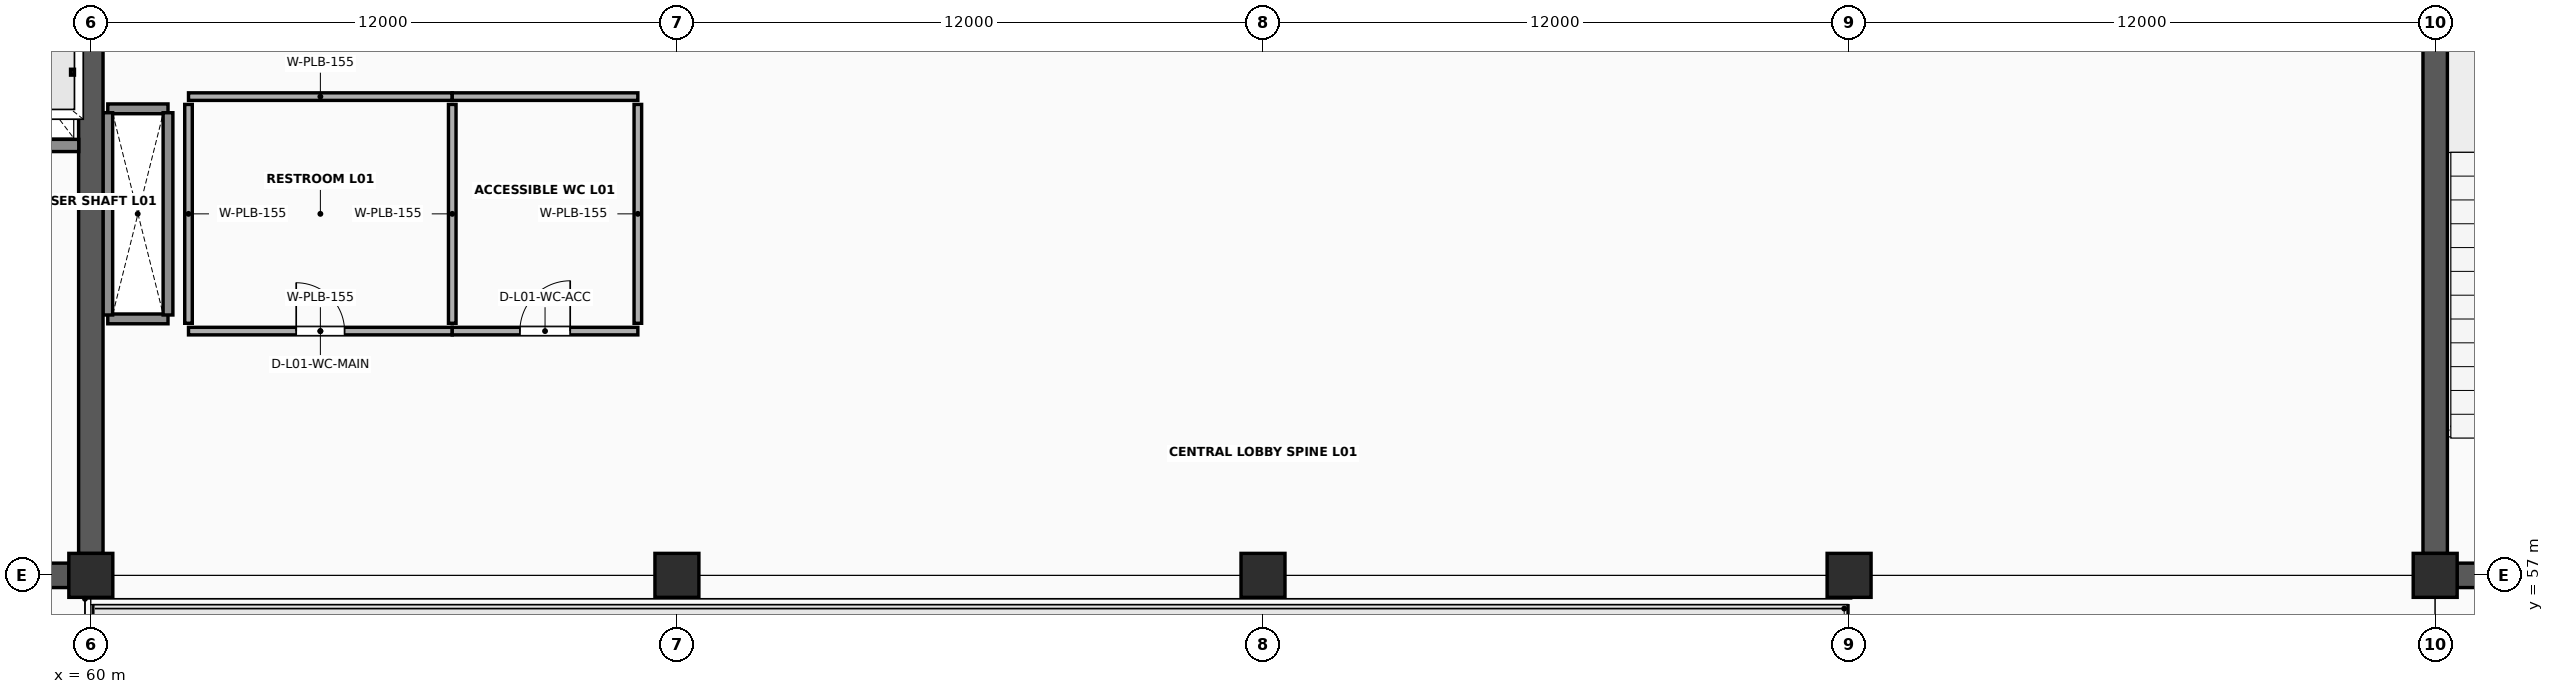
"""IFC4 building model, lengths in metres.
Left out: names, types, materials, properties, quantities, classifications, styles, units other than length and angle.
Written with IfcOpenShell. Run it as: python <this file> out.ifc"""

import sys

from ifc_helpers import new_model, si_unit, direction, frame, frame_2d, origin, origin_2d, place, context, subcontext, project, spatial, rectangle, extrude, element, fill, save


model = new_model("IFC4")
c1 = context("Model", 3, precision=1e-05, world=origin(), true_north=direction((0.0, 1.0)))
c2 = subcontext(c1, "Body", "Model", "MODEL_VIEW")
j1 = project(units=[si_unit("LENGTHUNIT", "METRE"), si_unit("PLANEANGLEUNIT", "RADIAN")], contexts=[c1])
p1 = place(None, origin())
s1 = spatial("IfcSite", under=j1, at=p1, CompositionType="ELEMENT")
p2 = place(p1, origin())
s2 = spatial("IfcBuilding", under=s1, at=p2, CompositionType="ELEMENT")
p3 = place(p2, frame((0.0, 0.0, 5.4)))
s3 = spatial("IfcBuildingStorey", under=s2, at=p3, CompositionType="ELEMENT", Elevation=5.4)
for number, where, z_axis, x_axis in (
    (1, (60.0, 57.0, 0.0), (0.0, 0.0, 1.0), (1.0, 0.0, 0.0)),
    (2, (72.0, 57.0, 0.0), (0.0, 0.0, 1.0), (1.0, 0.0, 0.0)),
    (3, (84.0, 57.0, 0.0), (0.0, 0.0, 1.0), (1.0, 0.0, 0.0)),
    (4, (96.0, 57.0, 0.0), (0.0, 0.0, 1.0), (1.0, 0.0, 0.0)),
    (5, (108.0, 57.0, 0.0), (0.0, 0.0, 1.0), (1.0, 0.0, 0.0)),
):
    element("IfcColumn", number, at=place(p3, frame(where, z_axis=z_axis, x_axis=x_axis)), inside=s3, PredefinedType="COLUMN", context=c2, shape_type="SweptSolid", body=[
        extrude(rectangle(XDim=0.9, YDim=0.9, at=origin_2d()), origin(), (0.0, 0.0, 1.0), 4.2),
    ])
for number, where, z_axis, x_axis in (
    (6, (60.347, 62.25, 0.0), (0.0, 0.0, 1.0), (1.0, 0.0, 0.0)),
    (7, (60.347, 66.55, 0.0), (0.0, 0.0, 1.0), (1.0, 0.0, 0.0)),
):
    element("IfcWall", number, at=place(p3, frame(where, z_axis=z_axis, x_axis=x_axis)), inside=s3, PredefinedType="SOLIDWALL", context=c2, shape_type="SweptSolid", body=[
        extrude(rectangle(XDim=1.233, YDim=0.2, at=frame_2d((0.617, 0.0))), origin(), (0.0, 0.0, 1.0), 4.043),
    ])
for number, where, z_axis, x_axis in (
    (8, (60.347, 62.33, 0.0), (0.0, 0.0, 1.0), (0.0, 1.0, 0.0)),
    (9, (61.58, 62.33, 0.0), (0.0, 0.0, 1.0), (0.0, 1.0, 0.0)),
):
    element("IfcWall", number, at=place(p3, frame(where, z_axis=z_axis, x_axis=x_axis)), inside=s3, PredefinedType="SOLIDWALL", context=c2, shape_type="SweptSolid", body=[
        extrude(rectangle(XDim=4.14, YDim=0.2, at=frame_2d((2.07, 0.0))), origin(), (0.0, 0.0, 1.0), 4.043),
    ])
p4 = place(p3, frame((48.447, 57.0, 0.0), z_axis=(0.0, 0.0, 1.0), x_axis=(1.0, 0.0, 0.0)))
e10 = element("IfcWall", 10, at=p4, inside=s3, PredefinedType="SHEAR", context=c2, shape_type="SweptSolid", body=[
    extrude(rectangle(XDim=11.106, YDim=0.5, at=frame_2d((5.553, 0.0))), origin(), (0.0, 0.0, 1.0), 4.043),
])
p5 = place(p4, frame((4.753, 0.0, 0.0)))
e11 = element("IfcOpeningElement", 11, at=p5, cuts=e10, PredefinedType="OPENING", context=c2, shape_type="SweptSolid", body=[
    extrude(rectangle(XDim=1.2, YDim=2.2, at=frame_2d((0.6, 1.1))), frame((0.0, 0.265, 0.0), z_axis=(0.0, -1.0, 0.0), x_axis=(1.0, 0.0, 0.0)), (0.0, 0.0, 1.0), 0.53),
])
p6 = place(p4, frame((8.453, 0.0, 0.0)))
e12 = element("IfcOpeningElement", 12, at=p6, cuts=e10, PredefinedType="OPENING", context=c2, shape_type="SweptSolid", body=[
    extrude(rectangle(XDim=1.5, YDim=2.25, at=frame_2d((0.75, 1.125))), frame((0.0, 0.265, 0.0), z_axis=(0.0, -1.0, 0.0), x_axis=(1.0, 0.0, 0.0)), (0.0, 0.0, 1.0), 0.53),
])
p7 = place(p3, frame((60.0, 57.447, 0.0), z_axis=(0.0, 0.0, 1.0), x_axis=(0.0, 1.0, 0.0)))
e13 = element("IfcWall", 13, at=p7, inside=s3, PredefinedType="SHEAR", context=c2, shape_type="SweptSolid", body=[
    extrude(rectangle(XDim=11.106, YDim=0.5, at=frame_2d((5.553, 0.0))), origin(), (0.0, 0.0, 1.0), 4.043),
])
p8 = place(p3, frame((52.597, 65.8, 0.0), z_axis=(0.0, 0.0, 1.0), x_axis=(1.0, 0.0, 0.0)))
e14 = element("IfcWall", 14, at=p8, inside=s3, PredefinedType="SOLIDWALL", context=c2, shape_type="SweptSolid", body=[
    extrude(rectangle(XDim=7.156, YDim=0.25, at=frame_2d((3.578, 0.0))), origin(), (0.0, 0.0, 1.0), 4.043),
])
p9 = place(p8, frame((0.653, 0.0, 0.0)))
e15 = element("IfcOpeningElement", 15, at=p9, cuts=e14, PredefinedType="OPENING", context=c2, shape_type="SweptSolid", body=[
    extrude(rectangle(XDim=1.1, YDim=2.24, at=frame_2d((0.55, 1.12))), frame((0.0, 0.14, 0.0), z_axis=(0.0, -1.0, 0.0), x_axis=(1.0, 0.0, 0.0)), (0.0, 0.0, 1.0), 0.28),
])
p10 = place(p8, frame((3.153, 0.0, 0.0)))
e16 = element("IfcOpeningElement", 16, at=p10, cuts=e14, PredefinedType="OPENING", context=c2, shape_type="SweptSolid", body=[
    extrude(rectangle(XDim=1.05, YDim=2.2, at=frame_2d((0.525, 1.1))), frame((0.0, 0.14, 0.0), z_axis=(0.0, -1.0, 0.0), x_axis=(1.0, 0.0, 0.0)), (0.0, 0.0, 1.0), 0.28),
])
p11 = place(p8, frame((5.528, 0.0, 0.0)))
e17 = element("IfcOpeningElement", 17, at=p11, cuts=e14, PredefinedType="OPENING", context=c2, shape_type="SweptSolid", body=[
    extrude(rectangle(XDim=1.05, YDim=2.2, at=frame_2d((0.525, 1.1))), frame((0.0, 0.14, 0.0), z_axis=(0.0, -1.0, 0.0), x_axis=(1.0, 0.0, 0.0)), (0.0, 0.0, 1.0), 0.28),
])
p12 = place(p3, frame((108.447, 57.0, 0.0), z_axis=(0.0, 0.0, 1.0), x_axis=(1.0, 0.0, 0.0)))
e18 = element("IfcWall", 18, at=p12, inside=s3, PredefinedType="SHEAR", context=c2, shape_type="SweptSolid", body=[
    extrude(rectangle(XDim=11.106, YDim=0.5, at=frame_2d((5.553, 0.0))), origin(), (0.0, 0.0, 1.0), 4.043),
])
p13 = place(p12, frame((4.753, 0.0, 0.0)))
e19 = element("IfcOpeningElement", 19, at=p13, cuts=e18, PredefinedType="OPENING", context=c2, shape_type="SweptSolid", body=[
    extrude(rectangle(XDim=1.2, YDim=2.2, at=frame_2d((0.6, 1.1))), frame((0.0, 0.265, 0.0), z_axis=(0.0, -1.0, 0.0), x_axis=(1.0, 0.0, 0.0)), (0.0, 0.0, 1.0), 0.53),
])
p14 = place(p12, frame((8.453, 0.0, 0.0)))
e20 = element("IfcOpeningElement", 20, at=p14, cuts=e18, PredefinedType="OPENING", context=c2, shape_type="SweptSolid", body=[
    extrude(rectangle(XDim=1.5, YDim=2.25, at=frame_2d((0.75, 1.125))), frame((0.0, 0.265, 0.0), z_axis=(0.0, -1.0, 0.0), x_axis=(1.0, 0.0, 0.0)), (0.0, 0.0, 1.0), 0.53),
])
p15 = place(p3, frame((108.0, 57.447, 0.0), z_axis=(0.0, 0.0, 1.0), x_axis=(0.0, 1.0, 0.0)))
e21 = element("IfcWall", 21, at=p15, inside=s3, PredefinedType="SHEAR", context=c2, shape_type="SweptSolid", body=[
    extrude(rectangle(XDim=11.106, YDim=0.5, at=frame_2d((5.553, 0.0))), origin(), (0.0, 0.0, 1.0), 4.043),
])
p16 = place(p3, frame((62.0, 62.0, 0.0), z_axis=(0.0, 0.0, 1.0), x_axis=(1.0, 0.0, 0.0)))
e22 = element("IfcWall", 22, at=p16, inside=s3, PredefinedType="PLUMBINGWALL", context=c2, shape_type="SweptSolid", body=[
    extrude(rectangle(XDim=5.4, YDim=0.155, at=frame_2d((2.7, 0.0))), origin(), (0.0, 0.0, 1.0), 2.75),
])
p17 = place(p16, frame((2.205, 0.0, 0.0)))
e23 = element("IfcOpeningElement", 23, at=p17, cuts=e22, PredefinedType="OPENING", context=c2, shape_type="SweptSolid", body=[
    extrude(rectangle(XDim=0.99, YDim=2.15, at=frame_2d((0.495, 1.075))), frame((0.0, 0.093, 0.0), z_axis=(0.0, -1.0, 0.0), x_axis=(1.0, 0.0, 0.0)), (0.0, 0.0, 1.0), 0.185),
])
p18 = place(p3, frame((62.0, 66.8, 0.0), z_axis=(0.0, 0.0, 1.0), x_axis=(1.0, 0.0, 0.0)))
e24 = element("IfcWall", 24, at=p18, inside=s3, PredefinedType="PLUMBINGWALL", context=c2, shape_type="SweptSolid", body=[
    extrude(rectangle(XDim=5.4, YDim=0.155, at=frame_2d((2.7, 0.0))), origin(), (0.0, 0.0, 1.0), 2.75),
])
for number, where, z_axis, x_axis in (
    (25, (62.0, 62.16, 0.0), (0.0, 0.0, 1.0), (0.0, 1.0, 0.0)),
    (26, (67.4, 62.16, 0.0), (0.0, 0.0, 1.0), (0.0, 1.0, 0.0)),
):
    element("IfcWall", number, at=place(p3, frame(where, z_axis=z_axis, x_axis=x_axis)), inside=s3, PredefinedType="PLUMBINGWALL", context=c2, shape_type="SweptSolid", body=[
        extrude(rectangle(XDim=4.48, YDim=0.155, at=frame_2d((2.24, 0.0))), origin(), (0.0, 0.0, 1.0), 2.75),
    ])
p19 = place(p3, frame((67.4, 62.0, 0.0), z_axis=(0.0, 0.0, 1.0), x_axis=(1.0, 0.0, 0.0)))
e27 = element("IfcWall", 27, at=p19, inside=s3, PredefinedType="PLUMBINGWALL", context=c2, shape_type="SweptSolid", body=[
    extrude(rectangle(XDim=3.8, YDim=0.155, at=frame_2d((1.9, 0.0))), origin(), (0.0, 0.0, 1.0), 2.75),
])
p20 = place(p19, frame((1.385, 0.0, 0.0)))
e28 = element("IfcOpeningElement", 28, at=p20, cuts=e27, PredefinedType="OPENING", context=c2, shape_type="SweptSolid", body=[
    extrude(rectangle(XDim=1.03, YDim=2.17, at=frame_2d((0.515, 1.085))), frame((0.0, 0.093, 0.0), z_axis=(0.0, -1.0, 0.0), x_axis=(1.0, 0.0, 0.0)), (0.0, 0.0, 1.0), 0.185),
])
p21 = place(p3, frame((67.4, 66.8, 0.0), z_axis=(0.0, 0.0, 1.0), x_axis=(1.0, 0.0, 0.0)))
e29 = element("IfcWall", 29, at=p21, inside=s3, PredefinedType="PLUMBINGWALL", context=c2, shape_type="SweptSolid", body=[
    extrude(rectangle(XDim=3.8, YDim=0.155, at=frame_2d((1.9, 0.0))), origin(), (0.0, 0.0, 1.0), 2.75),
])
p22 = place(p3, frame((71.2, 62.16, 0.0), z_axis=(0.0, 0.0, 1.0), x_axis=(0.0, 1.0, 0.0)))
e30 = element("IfcWall", 30, at=p22, inside=s3, PredefinedType="PLUMBINGWALL", context=c2, shape_type="SweptSolid", body=[
    extrude(rectangle(XDim=4.48, YDim=0.155, at=frame_2d((2.24, 0.0))), origin(), (0.0, 0.0, 1.0), 2.75),
])
p23 = place(p17, origin())
e31 = element("IfcDoor", 31, at=p23, inside=s3, OperationType="SINGLE_SWING_LEFT", PredefinedType="DOOR", context=c2, shape_type="SweptSolid", body=[
    extrude(rectangle(XDim=0.99, YDim=2.15, at=frame_2d((0.495, 1.075))), frame((0.0, 0.025, 0.0), z_axis=(0.0, -1.0, 0.0), x_axis=(1.0, 0.0, 0.0)), (0.0, 0.0, 1.0), 0.05),
])
fill(e23, e31)
p24 = place(p20, origin())
e32 = element("IfcDoor", 32, at=p24, inside=s3, OperationType="SINGLE_SWING_RIGHT", PredefinedType="DOOR", context=c2, shape_type="SweptSolid", body=[
    extrude(rectangle(XDim=1.03, YDim=2.17, at=frame_2d((0.515, 1.085))), frame((0.0, 0.025, 0.0), z_axis=(0.0, -1.0, 0.0), x_axis=(1.0, 0.0, 0.0)), (0.0, 0.0, 1.0), 0.05),
])
fill(e28, e32)
save(model, sys.argv[1])
